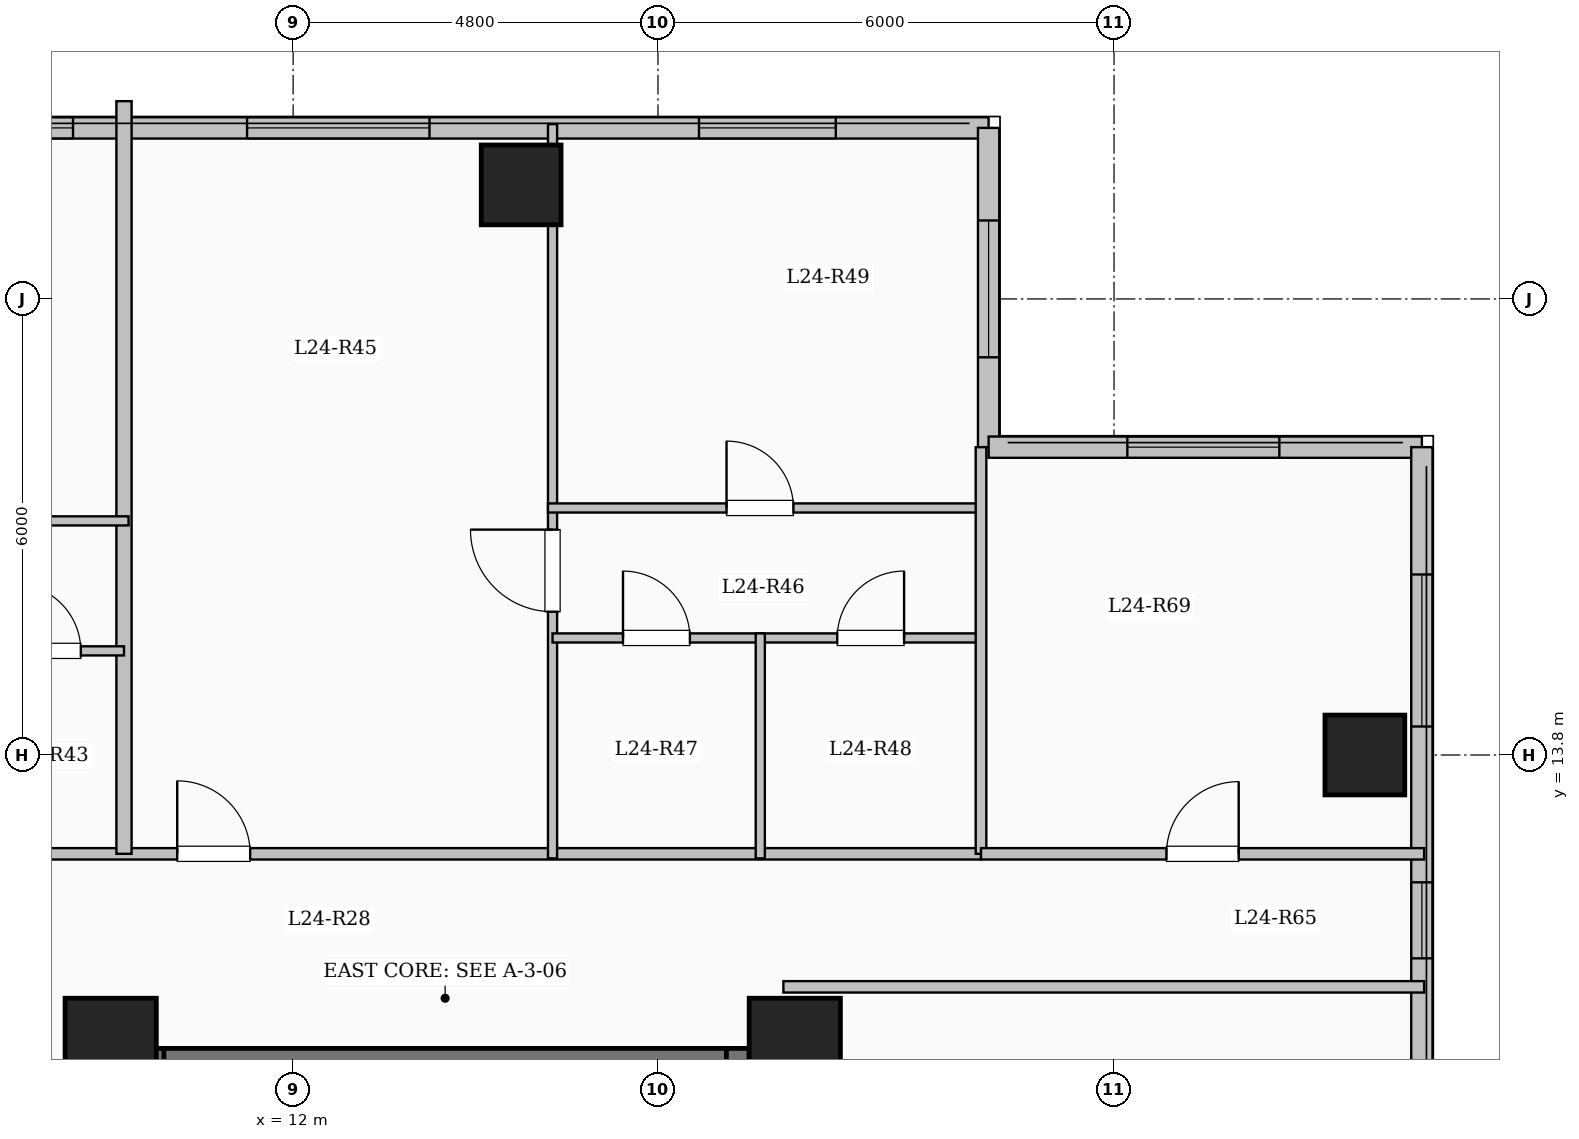
"""IFC4 building model, lengths in metres.
Left out: names, types, materials, properties, quantities, classifications, styles, units other than length and angle.
Written with IfcOpenShell. Run it as: python <this file> out.ifc"""

import sys

from ifc_helpers import new_model, si_unit, direction, frame, frame_2d, origin, origin_2d, place, context, subcontext, project, spatial, rectangle, extrude, element, fill, save


model = new_model("IFC4")
c1 = context("Model", 3, precision=1e-05, world=origin(), true_north=direction((0.0, 1.0)))
c2 = subcontext(c1, "Body", "Model", "MODEL_VIEW")
j1 = project(units=[si_unit("LENGTHUNIT", "METRE"), si_unit("PLANEANGLEUNIT", "RADIAN")], contexts=[c1])
p1 = place(None, origin())
s1 = spatial("IfcSite", under=j1, at=p1, CompositionType="ELEMENT")
p2 = place(p1, origin())
s2 = spatial("IfcBuilding", under=s1, at=p2, CompositionType="ELEMENT")
p3 = place(p2, frame((0.0, 0.0, 91.7)))
s3 = spatial("IfcBuildingStorey", under=s2, at=p3, CompositionType="ELEMENT", Elevation=91.7)
for number, where, z_axis, x_axis in (
    (1, (9.6, 10.0, 0.0), (0.0, 0.0, 1.0), (1.0, 0.0, 0.0)),
    (2, (18.6, 10.0, 0.0), (0.0, 0.0, 1.0), (1.0, 0.0, 0.0)),
):
    element("IfcColumn", number, at=place(p3, frame(where, z_axis=z_axis, x_axis=x_axis)), inside=s3, PredefinedType="COLUMN", context=c2, shape_type="SweptSolid", body=[
        extrude(rectangle(XDim=1.2, YDim=1.2, at=origin_2d()), origin(), (0.0, 0.0, 1.0), 3.35),
    ])
for number, where, z_axis, x_axis in (
    (3, (15.0, 21.3, 0.0), (0.0, 0.0, 1.0), (1.0, 0.0, 0.0)),
    (4, (26.1, 13.8, 0.0), (0.0, 0.0, 1.0), (1.0, 0.0, 0.0)),
):
    element("IfcColumn", number, at=place(p3, frame(where, z_axis=z_axis, x_axis=x_axis)), inside=s3, PredefinedType="COLUMN", context=c2, shape_type="SweptSolid", body=[
        extrude(rectangle(XDim=1.05, YDim=1.05, at=origin_2d()), origin(), (0.0, 0.0, 1.0), 3.35),
    ])
p4 = place(p3, frame((7.35, 22.05, 0.0), z_axis=(0.0, 0.0, 1.0), x_axis=(1.0, 0.0, 0.0)))
e5 = element("IfcWall", 5, at=p4, inside=s3, PredefinedType="SOLIDWALL", context=c2, shape_type="SweptSolid", body=[
    extrude(rectangle(XDim=13.8, YDim=0.28, at=frame_2d((6.9, 0.0))), origin(), (0.0, 0.0, 1.0), 3.1),
])
p5 = place(p4, frame((0.554, 0.0, 0.95)))
e6 = element("IfcOpeningElement", 6, at=p5, cuts=e5, PredefinedType="OPENING", context=c2, shape_type="SweptSolid", body=[
    extrude(rectangle(XDim=1.2, YDim=1.5, at=frame_2d((0.6, 0.75))), frame((0.0, 0.15, 0.0), z_axis=(0.0, -1.0, 0.0), x_axis=(1.0, 0.0, 0.0)), (0.0, 0.0, 1.0), 0.3),
])
p6 = place(p4, frame((4.044, 0.0, 0.9)))
e7 = element("IfcOpeningElement", 7, at=p6, cuts=e5, PredefinedType="OPENING", context=c2, shape_type="SweptSolid", body=[
    extrude(rectangle(XDim=2.4, YDim=1.8, at=frame_2d((1.2, 0.9))), frame((0.0, 0.15, 0.0), z_axis=(0.0, -1.0, 0.0), x_axis=(1.0, 0.0, 0.0)), (0.0, 0.0, 1.0), 0.3),
])
p7 = place(p4, frame((9.99, 0.0, 0.9)))
e8 = element("IfcOpeningElement", 8, at=p7, cuts=e5, PredefinedType="OPENING", context=c2, shape_type="SweptSolid", body=[
    extrude(rectangle(XDim=1.8, YDim=1.65, at=frame_2d((0.9, 0.825))), frame((0.0, 0.15, 0.0), z_axis=(0.0, -1.0, 0.0), x_axis=(1.0, 0.0, 0.0)), (0.0, 0.0, 1.0), 0.3),
])
p8 = place(p3, frame((21.15, 22.05, 0.0), z_axis=(0.0, 0.0, 1.0), x_axis=(0.0, -1.0, 0.0)))
e9 = element("IfcWall", 9, at=p8, inside=s3, PredefinedType="SOLIDWALL", context=c2, shape_type="SweptSolid", body=[
    extrude(rectangle(XDim=4.2, YDim=0.28, at=frame_2d((2.1, 0.0))), origin(), (0.0, 0.0, 1.0), 3.1),
])
p9 = place(p8, frame((1.218, 0.0, 0.9)))
e10 = element("IfcOpeningElement", 10, at=p9, cuts=e9, PredefinedType="OPENING", context=c2, shape_type="SweptSolid", body=[
    extrude(rectangle(XDim=1.8, YDim=1.65, at=frame_2d((0.9, 0.825))), frame((0.0, 0.15, 0.0), z_axis=(0.0, -1.0, 0.0), x_axis=(1.0, 0.0, 0.0)), (0.0, 0.0, 1.0), 0.3),
])
p10 = place(p3, frame((21.15, 17.85, 0.0), z_axis=(0.0, 0.0, 1.0), x_axis=(1.0, 0.0, 0.0)))
e11 = element("IfcWall", 11, at=p10, inside=s3, PredefinedType="SOLIDWALL", context=c2, shape_type="SweptSolid", body=[
    extrude(rectangle(XDim=5.7, YDim=0.28, at=frame_2d((2.85, 0.0))), origin(), (0.0, 0.0, 1.0), 3.1),
])
p11 = place(p10, frame((1.825, 0.0, 0.9)))
e12 = element("IfcOpeningElement", 12, at=p11, cuts=e11, PredefinedType="OPENING", context=c2, shape_type="SweptSolid", body=[
    extrude(rectangle(XDim=2.0, YDim=1.7, at=frame_2d((1.0, 0.85))), frame((0.0, 0.15, 0.0), z_axis=(0.0, -1.0, 0.0), x_axis=(1.0, 0.0, 0.0)), (0.0, 0.0, 1.0), 0.3),
])
p12 = place(p3, frame((26.85, 17.85, 0.0), z_axis=(0.0, 0.0, 1.0), x_axis=(0.0, -1.0, 0.0)))
e13 = element("IfcWall", 13, at=p12, inside=s3, PredefinedType="SOLIDWALL", context=c2, shape_type="SweptSolid", body=[
    extrude(rectangle(XDim=35.7, YDim=0.28, at=frame_2d((17.85, 0.0))), origin(), (0.0, 0.0, 1.0), 3.1),
])
p13 = place(p12, frame((1.675, 0.0, 0.9)))
e14 = element("IfcOpeningElement", 14, at=p13, cuts=e13, PredefinedType="OPENING", context=c2, shape_type="SweptSolid", body=[
    extrude(rectangle(XDim=2.0, YDim=1.7, at=frame_2d((1.0, 0.85))), frame((0.0, 0.15, 0.0), z_axis=(0.0, -1.0, 0.0), x_axis=(1.0, 0.0, 0.0)), (0.0, 0.0, 1.0), 0.3),
])
p14 = place(p12, frame((5.725, 0.0, 0.95)))
e15 = element("IfcOpeningElement", 15, at=p14, cuts=e13, PredefinedType="OPENING", context=c2, shape_type="SweptSolid", body=[
    extrude(rectangle(XDim=1.0, YDim=1.5, at=frame_2d((0.5, 0.75))), frame((0.0, 0.15, 0.0), z_axis=(0.0, -1.0, 0.0), x_axis=(1.0, 0.0, 0.0)), (0.0, 0.0, 1.0), 0.3),
])
p15 = place(p12, frame((8.975, 0.0, 0.9)))
e16 = element("IfcOpeningElement", 16, at=p15, cuts=e13, PredefinedType="OPENING", context=c2, shape_type="SweptSolid", body=[
    extrude(rectangle(XDim=2.0, YDim=1.7, at=frame_2d((1.0, 0.85))), frame((0.0, 0.15, 0.0), z_axis=(0.0, -1.0, 0.0), x_axis=(1.0, 0.0, 0.0)), (0.0, 0.0, 1.0), 0.3),
])
p16 = place(p12, frame((13.725, 0.0, 0.9)))
e17 = element("IfcOpeningElement", 17, at=p16, cuts=e13, PredefinedType="OPENING", context=c2, shape_type="SweptSolid", body=[
    extrude(rectangle(XDim=1.8, YDim=1.65, at=frame_2d((0.9, 0.825))), frame((0.0, 0.15, 0.0), z_axis=(0.0, -1.0, 0.0), x_axis=(1.0, 0.0, 0.0)), (0.0, 0.0, 1.0), 0.3),
])
p17 = place(p12, frame((19.55, 0.0, 0.9)))
e18 = element("IfcOpeningElement", 18, at=p17, cuts=e13, PredefinedType="OPENING", context=c2, shape_type="SweptSolid", body=[
    extrude(rectangle(XDim=2.4, YDim=1.8, at=frame_2d((1.2, 0.9))), frame((0.0, 0.15, 0.0), z_axis=(0.0, -1.0, 0.0), x_axis=(1.0, 0.0, 0.0)), (0.0, 0.0, 1.0), 0.3),
])
p18 = place(p12, frame((25.857, 0.0, 0.9)))
e19 = element("IfcOpeningElement", 19, at=p18, cuts=e13, PredefinedType="OPENING", context=c2, shape_type="SweptSolid", body=[
    extrude(rectangle(XDim=1.5, YDim=1.65, at=frame_2d((0.75, 0.825))), frame((0.0, 0.15, 0.0), z_axis=(0.0, -1.0, 0.0), x_axis=(1.0, 0.0, 0.0)), (0.0, 0.0, 1.0), 0.3),
])
p19 = place(p12, frame((30.75, 0.0, 0.9)))
e20 = element("IfcOpeningElement", 20, at=p19, cuts=e13, PredefinedType="OPENING", context=c2, shape_type="SweptSolid", body=[
    extrude(rectangle(XDim=2.4, YDim=1.8, at=frame_2d((1.2, 0.9))), frame((0.0, 0.15, 0.0), z_axis=(0.0, -1.0, 0.0), x_axis=(1.0, 0.0, 0.0)), (0.0, 0.0, 1.0), 0.3),
])
p20 = place(p3, frame((10.0, 9.79, 0.0), z_axis=(0.0, 0.0, 1.0), x_axis=(1.0, 0.0, 0.0)))
e21 = element("IfcWall", 21, at=p20, inside=s3, PredefinedType="SHEAR", context=c2, shape_type="SweptSolid", body=[
    extrude(rectangle(XDim=8.0, YDim=0.3, at=frame_2d((4.0, 0.0))), origin(), (0.0, 0.0, 1.0), 3.35),
])
for number, where, z_axis, x_axis in (
    (22, (10.15, 6.35, 0.0), (0.0, 0.0, 1.0), (0.0, 1.0, 0.0)),
    (23, (17.85, 6.35, 0.0), (0.0, 0.0, 1.0), (0.0, 1.0, 0.0)),
):
    element("IfcWall", number, at=place(p3, frame(where, z_axis=z_axis, x_axis=x_axis)), inside=s3, PredefinedType="SHEAR", context=c2, shape_type="SweptSolid", body=[
        extrude(rectangle(XDim=3.59, YDim=0.3, at=frame_2d((1.795, 0.0))), origin(), (0.0, 0.0, 1.0), 3.35),
    ])
p21 = place(p3, frame((3.85, 12.5, 0.0), z_axis=(0.0, 0.0, 1.0), x_axis=(1.0, 0.0, 0.0)))
e24 = element("IfcWall", 24, at=p21, inside=s3, PredefinedType="PARTITIONING", context=c2, shape_type="SweptSolid", body=[
    extrude(rectangle(XDim=17.2, YDim=0.15, at=frame_2d((8.6, 0.0))), origin(), (0.0, 0.0, 1.0), 3.1),
])
p22 = place(p21, frame((1.6, 0.0, 0.0)))
e25 = element("IfcOpeningElement", 25, at=p22, cuts=e24, PredefinedType="OPENING", context=c2, shape_type="SweptSolid", body=[
    extrude(rectangle(XDim=0.96, YDim=2.15, at=frame_2d((0.48, 1.075))), frame((0.0, 0.085, 0.0), z_axis=(0.0, -1.0, 0.0), x_axis=(1.0, 0.0, 0.0)), (0.0, 0.0, 1.0), 0.17),
])
p23 = place(p21, frame((6.625, 0.0, 0.0)))
e26 = element("IfcOpeningElement", 26, at=p23, cuts=e24, PredefinedType="OPENING", context=c2, shape_type="SweptSolid", body=[
    extrude(rectangle(XDim=0.96, YDim=2.15, at=frame_2d((0.48, 1.075))), frame((0.0, 0.085, 0.0), z_axis=(0.0, -1.0, 0.0), x_axis=(1.0, 0.0, 0.0)), (0.0, 0.0, 1.0), 0.17),
])
p24 = place(p3, frame((9.775, 12.5, 0.0), z_axis=(0.0, 0.0, 1.0), x_axis=(0.0, 1.0, 0.0)))
e27 = element("IfcWall", 27, at=p24, inside=s3, PredefinedType="SOLIDWALL", context=c2, shape_type="SweptSolid", body=[
    extrude(rectangle(XDim=9.902, YDim=0.2, at=frame_2d((4.951, 0.0))), origin(), (0.0, 0.0, 1.0), 3.1),
])
p25 = place(p3, frame((7.758, 15.17, 0.0), z_axis=(0.0, 0.0, 1.0), x_axis=(1.0, 0.0, 0.0)))
e28 = element("IfcWall", 28, at=p25, inside=s3, PredefinedType="PARTITIONING", context=c2, shape_type="SweptSolid", body=[
    extrude(rectangle(XDim=2.017, YDim=0.12, at=frame_2d((1.008, 0.0))), origin(), (0.0, 0.0, 1.0), 3.1),
])
p26 = place(p25, frame((0.569, 0.0, 0.0)))
e29 = element("IfcOpeningElement", 29, at=p26, cuts=e28, PredefinedType="OPENING", context=c2, shape_type="SweptSolid", body=[
    extrude(rectangle(XDim=0.88, YDim=2.1, at=frame_2d((0.44, 1.05))), frame((0.0, 0.07, 0.0), z_axis=(0.0, -1.0, 0.0), x_axis=(1.0, 0.0, 0.0)), (0.0, 0.0, 1.0), 0.14),
])
p27 = place(p3, frame((5.103, 16.88, 0.0), z_axis=(0.0, 0.0, 1.0), x_axis=(1.0, 0.0, 0.0)))
e30 = element("IfcWall", 30, at=p27, inside=s3, PredefinedType="PARTITIONING", context=c2, shape_type="SweptSolid", body=[
    extrude(rectangle(XDim=4.732, YDim=0.12, at=frame_2d((2.366, 0.0))), origin(), (0.0, 0.0, 1.0), 3.1),
])
p28 = place(p27, frame((1.836, 0.0, 0.0)))
e31 = element("IfcOpeningElement", 31, at=p28, cuts=e30, PredefinedType="OPENING", context=c2, shape_type="SweptSolid", body=[
    extrude(rectangle(XDim=0.88, YDim=2.1, at=frame_2d((0.44, 1.05))), frame((0.0, 0.07, 0.0), z_axis=(0.0, -1.0, 0.0), x_axis=(1.0, 0.0, 0.0)), (0.0, 0.0, 1.0), 0.14),
])
p29 = place(p3, frame((15.413, 12.44, 0.0), z_axis=(0.0, 0.0, 1.0), x_axis=(0.0, 1.0, 0.0)))
e32 = element("IfcWall", 32, at=p29, inside=s3, PredefinedType="PARTITIONING", context=c2, shape_type="SweptSolid", body=[
    extrude(rectangle(XDim=9.66, YDim=0.12, at=frame_2d((4.83, 0.0))), origin(), (0.0, 0.0, 1.0), 3.1),
])
p30 = place(p29, frame((3.245, 0.0, 0.0)))
e33 = element("IfcOpeningElement", 33, at=p30, cuts=e32, PredefinedType="OPENING", context=c2, shape_type="SweptSolid", body=[
    extrude(rectangle(XDim=1.08, YDim=2.15, at=frame_2d((0.54, 1.075))), frame((0.0, 0.07, 0.0), z_axis=(0.0, -1.0, 0.0), x_axis=(1.0, 0.0, 0.0)), (0.0, 0.0, 1.0), 0.14),
])
p31 = place(p3, frame((15.413, 15.34, 0.0), z_axis=(0.0, 0.0, 1.0), x_axis=(1.0, 0.0, 0.0)))
e34 = element("IfcWall", 34, at=p31, inside=s3, PredefinedType="PARTITIONING", context=c2, shape_type="SweptSolid", body=[
    extrude(rectangle(XDim=2.733, YDim=0.12, at=frame_2d((1.366, 0.0))), origin(), (0.0, 0.0, 1.0), 3.1),
])
p32 = place(p31, frame((0.927, 0.0, 0.0)))
e35 = element("IfcOpeningElement", 35, at=p32, cuts=e34, PredefinedType="OPENING", context=c2, shape_type="SweptSolid", body=[
    extrude(rectangle(XDim=0.88, YDim=2.1, at=frame_2d((0.44, 1.05))), frame((0.0, 0.07, 0.0), z_axis=(0.0, -1.0, 0.0), x_axis=(1.0, 0.0, 0.0)), (0.0, 0.0, 1.0), 0.14),
])
p33 = place(p3, frame((18.146, 15.34, 0.0), z_axis=(0.0, 0.0, 1.0), x_axis=(1.0, 0.0, 0.0)))
e36 = element("IfcWall", 36, at=p33, inside=s3, PredefinedType="PARTITIONING", context=c2, shape_type="SweptSolid", body=[
    extrude(rectangle(XDim=2.904, YDim=0.12, at=frame_2d((1.452, 0.0))), origin(), (0.0, 0.0, 1.0), 3.1),
])
p34 = place(p33, frame((1.012, 0.0, 0.0)))
e37 = element("IfcOpeningElement", 37, at=p34, cuts=e36, PredefinedType="OPENING", context=c2, shape_type="SweptSolid", body=[
    extrude(rectangle(XDim=0.88, YDim=2.1, at=frame_2d((0.44, 1.05))), frame((0.0, 0.07, 0.0), z_axis=(0.0, -1.0, 0.0), x_axis=(1.0, 0.0, 0.0)), (0.0, 0.0, 1.0), 0.14),
])
p35 = place(p3, frame((15.353, 17.05, 0.0), z_axis=(0.0, 0.0, 1.0), x_axis=(1.0, 0.0, 0.0)))
e38 = element("IfcWall", 38, at=p35, inside=s3, PredefinedType="PARTITIONING", context=c2, shape_type="SweptSolid", body=[
    extrude(rectangle(XDim=5.757, YDim=0.12, at=frame_2d((2.878, 0.0))), origin(), (0.0, 0.0, 1.0), 3.1),
])
p36 = place(p35, frame((2.349, 0.0, 0.0)))
e39 = element("IfcOpeningElement", 39, at=p36, cuts=e38, PredefinedType="OPENING", context=c2, shape_type="SweptSolid", body=[
    extrude(rectangle(XDim=0.88, YDim=2.1, at=frame_2d((0.44, 1.05))), frame((0.0, 0.07, 0.0), z_axis=(0.0, -1.0, 0.0), x_axis=(1.0, 0.0, 0.0)), (0.0, 0.0, 1.0), 0.14),
])
p37 = place(p3, frame((18.146, 12.44, 0.0), z_axis=(0.0, 0.0, 1.0), x_axis=(0.0, 1.0, 0.0)))
e40 = element("IfcWall", 40, at=p37, inside=s3, PredefinedType="PARTITIONING", context=c2, shape_type="SweptSolid", body=[
    extrude(rectangle(XDim=2.96, YDim=0.12, at=frame_2d((1.48, 0.0))), origin(), (0.0, 0.0, 1.0), 3.1),
])
p38 = place(p3, frame((18.45, 10.75, 0.0), z_axis=(0.0, 0.0, 1.0), x_axis=(1.0, 0.0, 0.0)))
e41 = element("IfcWall", 41, at=p38, inside=s3, PredefinedType="PARTITIONING", context=c2, shape_type="SweptSolid", body=[
    extrude(rectangle(XDim=8.43, YDim=0.15, at=frame_2d((4.215, 0.0))), origin(), (0.0, 0.0, 1.0), 3.1),
])
p39 = place(p3, frame((21.05, 12.5, 0.0), z_axis=(0.0, 0.0, 1.0), x_axis=(0.0, 1.0, 0.0)))
e42 = element("IfcWall", 42, at=p39, inside=s3, PredefinedType="PARTITIONING", context=c2, shape_type="SweptSolid", body=[
    extrude(rectangle(XDim=5.35, YDim=0.14, at=frame_2d((2.675, 0.0))), origin(), (0.0, 0.0, 1.0), 3.1),
])
p40 = place(p3, frame((21.05, 12.5, 0.0), z_axis=(0.0, 0.0, 1.0), x_axis=(1.0, 0.0, 0.0)))
e43 = element("IfcWall", 43, at=p40, inside=s3, PredefinedType="PARTITIONING", context=c2, shape_type="SweptSolid", body=[
    extrude(rectangle(XDim=5.83, YDim=0.15, at=frame_2d((2.915, 0.0))), origin(), (0.0, 0.0, 1.0), 3.1),
])
p41 = place(p40, frame((2.44, 0.0, 0.0)))
e44 = element("IfcOpeningElement", 44, at=p41, cuts=e43, PredefinedType="OPENING", context=c2, shape_type="SweptSolid", body=[
    extrude(rectangle(XDim=0.95, YDim=2.15, at=frame_2d((0.475, 1.075))), frame((0.0, 0.085, 0.0), z_axis=(0.0, -1.0, 0.0), x_axis=(1.0, 0.0, 0.0)), (0.0, 0.0, 1.0), 0.17),
])
p42 = place(p5, origin())
e45 = element("IfcWindow", 45, at=p42, inside=s3, PartitioningType="SINGLE_PANEL", PredefinedType="WINDOW", context=c2, shape_type="SweptSolid", body=[
    extrude(rectangle(XDim=1.2, YDim=1.5, at=frame_2d((0.6, 0.75))), frame((0.0, 0.03, 0.0), z_axis=(0.0, -1.0, 0.0), x_axis=(1.0, 0.0, 0.0)), (0.0, 0.0, 1.0), 0.06),
])
fill(e6, e45)
p43 = place(p6, origin())
e46 = element("IfcWindow", 46, at=p43, inside=s3, PartitioningType="SINGLE_PANEL", PredefinedType="WINDOW", context=c2, shape_type="SweptSolid", body=[
    extrude(rectangle(XDim=2.4, YDim=1.8, at=frame_2d((1.2, 0.9))), frame((0.0, 0.03, 0.0), z_axis=(0.0, -1.0, 0.0), x_axis=(1.0, 0.0, 0.0)), (0.0, 0.0, 1.0), 0.06),
])
fill(e7, e46)
p44 = place(p7, origin())
e47 = element("IfcWindow", 47, at=p44, inside=s3, PartitioningType="SINGLE_PANEL", PredefinedType="WINDOW", context=c2, shape_type="SweptSolid", body=[
    extrude(rectangle(XDim=1.8, YDim=1.65, at=frame_2d((0.9, 0.825))), frame((0.0, 0.03, 0.0), z_axis=(0.0, -1.0, 0.0), x_axis=(1.0, 0.0, 0.0)), (0.0, 0.0, 1.0), 0.06),
])
fill(e8, e47)
p45 = place(p9, origin())
e48 = element("IfcWindow", 48, at=p45, inside=s3, PartitioningType="SINGLE_PANEL", PredefinedType="WINDOW", context=c2, shape_type="SweptSolid", body=[
    extrude(rectangle(XDim=1.8, YDim=1.65, at=frame_2d((0.9, 0.825))), frame((0.0, 0.03, 0.0), z_axis=(0.0, -1.0, 0.0), x_axis=(1.0, 0.0, 0.0)), (0.0, 0.0, 1.0), 0.06),
])
fill(e10, e48)
p46 = place(p11, origin())
e49 = element("IfcWindow", 49, at=p46, inside=s3, PartitioningType="SINGLE_PANEL", PredefinedType="WINDOW", context=c2, shape_type="SweptSolid", body=[
    extrude(rectangle(XDim=2.0, YDim=1.7, at=frame_2d((1.0, 0.85))), frame((0.0, 0.03, 0.0), z_axis=(0.0, -1.0, 0.0), x_axis=(1.0, 0.0, 0.0)), (0.0, 0.0, 1.0), 0.06),
])
fill(e12, e49)
p47 = place(p13, origin())
e50 = element("IfcWindow", 50, at=p47, inside=s3, PartitioningType="SINGLE_PANEL", PredefinedType="WINDOW", context=c2, shape_type="SweptSolid", body=[
    extrude(rectangle(XDim=2.0, YDim=1.7, at=frame_2d((1.0, 0.85))), frame((0.0, 0.03, 0.0), z_axis=(0.0, -1.0, 0.0), x_axis=(1.0, 0.0, 0.0)), (0.0, 0.0, 1.0), 0.06),
])
fill(e14, e50)
p48 = place(p14, origin())
e51 = element("IfcWindow", 51, at=p48, inside=s3, PartitioningType="SINGLE_PANEL", PredefinedType="WINDOW", context=c2, shape_type="SweptSolid", body=[
    extrude(rectangle(XDim=1.0, YDim=1.5, at=frame_2d((0.5, 0.75))), frame((0.0, 0.03, 0.0), z_axis=(0.0, -1.0, 0.0), x_axis=(1.0, 0.0, 0.0)), (0.0, 0.0, 1.0), 0.06),
])
fill(e15, e51)
p49 = place(p26, origin())
e52 = element("IfcDoor", 52, at=p49, inside=s3, OperationType="SINGLE_SWING_LEFT", PredefinedType="DOOR", context=c2, shape_type="SweptSolid", body=[
    extrude(rectangle(XDim=0.88, YDim=2.1, at=frame_2d((0.44, 1.05))), frame((0.0, 0.025, 0.0), z_axis=(0.0, -1.0, 0.0), x_axis=(1.0, 0.0, 0.0)), (0.0, 0.0, 1.0), 0.05),
])
fill(e29, e52)
p50 = place(p23, origin())
e53 = element("IfcDoor", 53, at=p50, inside=s3, OperationType="SINGLE_SWING_LEFT", PredefinedType="DOOR", context=c2, shape_type="SweptSolid", body=[
    extrude(rectangle(XDim=0.96, YDim=2.15, at=frame_2d((0.48, 1.075))), frame((0.0, 0.025, 0.0), z_axis=(0.0, -1.0, 0.0), x_axis=(1.0, 0.0, 0.0)), (0.0, 0.0, 1.0), 0.05),
])
fill(e26, e53)
p51 = place(p30, origin())
e54 = element("IfcDoor", 54, at=p51, inside=s3, OperationType="SINGLE_SWING_RIGHT", PredefinedType="DOOR", context=c2, shape_type="SweptSolid", body=[
    extrude(rectangle(XDim=1.08, YDim=2.15, at=frame_2d((0.54, 1.075))), frame((0.0, 0.025, 0.0), z_axis=(0.0, -1.0, 0.0), x_axis=(1.0, 0.0, 0.0)), (0.0, 0.0, 1.0), 0.05),
])
fill(e33, e54)
p52 = place(p32, origin())
e55 = element("IfcDoor", 55, at=p52, inside=s3, OperationType="SINGLE_SWING_LEFT", PredefinedType="DOOR", context=c2, shape_type="SweptSolid", body=[
    extrude(rectangle(XDim=0.88, YDim=2.1, at=frame_2d((0.44, 1.05))), frame((0.0, 0.025, 0.0), z_axis=(0.0, -1.0, 0.0), x_axis=(1.0, 0.0, 0.0)), (0.0, 0.0, 1.0), 0.05),
])
fill(e35, e55)
p53 = place(p34, origin())
e56 = element("IfcDoor", 56, at=p53, inside=s3, OperationType="SINGLE_SWING_RIGHT", PredefinedType="DOOR", context=c2, shape_type="SweptSolid", body=[
    extrude(rectangle(XDim=0.88, YDim=2.1, at=frame_2d((0.44, 1.05))), frame((0.0, 0.025, 0.0), z_axis=(0.0, -1.0, 0.0), x_axis=(1.0, 0.0, 0.0)), (0.0, 0.0, 1.0), 0.05),
])
fill(e37, e56)
p54 = place(p36, origin())
e57 = element("IfcDoor", 57, at=p54, inside=s3, OperationType="SINGLE_SWING_LEFT", PredefinedType="DOOR", context=c2, shape_type="SweptSolid", body=[
    extrude(rectangle(XDim=0.88, YDim=2.1, at=frame_2d((0.44, 1.05))), frame((0.0, 0.025, 0.0), z_axis=(0.0, -1.0, 0.0), x_axis=(1.0, 0.0, 0.0)), (0.0, 0.0, 1.0), 0.05),
])
fill(e39, e57)
p55 = place(p41, origin())
e58 = element("IfcDoor", 58, at=p55, inside=s3, OperationType="SINGLE_SWING_RIGHT", PredefinedType="DOOR", context=c2, shape_type="SweptSolid", body=[
    extrude(rectangle(XDim=0.95, YDim=2.15, at=frame_2d((0.475, 1.075))), frame((0.0, 0.025, 0.0), z_axis=(0.0, -1.0, 0.0), x_axis=(1.0, 0.0, 0.0)), (0.0, 0.0, 1.0), 0.05),
])
fill(e44, e58)
save(model, sys.argv[1])
